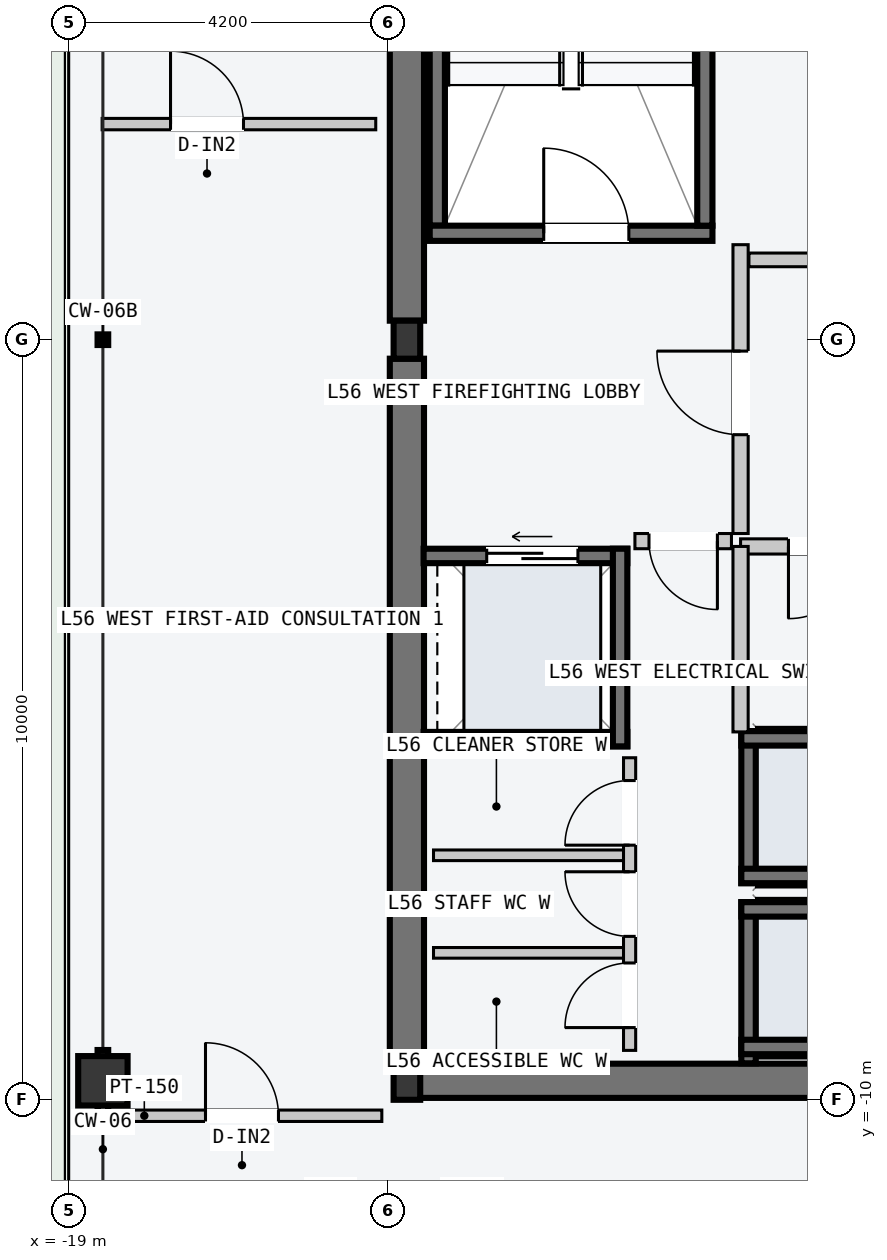
"""IFC4 building model, lengths in metres.
Left out: names, types, materials, properties, quantities, classifications, styles, units other than length and angle.
Written with IfcOpenShell. Run it as: python <this file> out.ifc"""

import sys

from ifc_helpers import new_model, si_unit, direction, frame, frame_2d, origin, origin_2d, place, context, subcontext, project, spatial, rectangle, hollow_rectangle, i_section, extrude, element, fill, save


model = new_model("IFC4")
c1 = context("Model", 3, precision=1e-05, world=origin(), true_north=direction((0.0, 1.0)))
c2 = subcontext(c1, "Body", "Model", "MODEL_VIEW")
j1 = project(units=[si_unit("LENGTHUNIT", "METRE"), si_unit("PLANEANGLEUNIT", "RADIAN")], contexts=[c1])
p1 = place(None, origin())
s1 = spatial("IfcSite", under=j1, at=p1, CompositionType="ELEMENT")
p2 = place(p1, origin())
s2 = spatial("IfcBuilding", under=s1, at=p2, CompositionType="ELEMENT")
p3 = place(p2, frame((0.0, 0.0, 213.9)))
s3 = spatial("IfcBuildingStorey", under=s2, at=p3, CompositionType="ELEMENT", Elevation=213.9)
p4 = place(p3, frame((-14.53, -9.75, -0.2), z_axis=(0.0, 0.0, 1.0), x_axis=(1.0, 0.0, 0.0)))
e1 = element("IfcWall", 1, at=p4, inside=s3, PredefinedType="SHEAR", context=c2, shape_type="SweptSolid", body=[
    extrude(rectangle(XDim=6.46, YDim=0.45, at=frame_2d((3.23, 0.0))), origin(), (0.0, 0.0, 1.0), 4.5),
])
for number, where, z_axis, x_axis in (
    (2, (-14.55, -9.5, -0.2), (0.0, 0.0, 1.0), (0.0, 1.0, 0.0)),
    (3, (-14.55, 0.25, -0.2), (0.0, 0.0, 1.0), (0.0, 1.0, 0.0)),
):
    element("IfcWall", number, at=place(p3, frame(where, z_axis=z_axis, x_axis=x_axis)), inside=s3, PredefinedType="SHEAR", context=c2, shape_type="SweptSolid", body=[
        extrude(rectangle(XDim=9.25, YDim=0.45, at=frame_2d((4.625, 0.0))), origin(), (0.0, 0.0, 1.0), 4.5),
    ])
p5 = place(p3, frame((-14.15, 1.5, -0.2), z_axis=(0.0, 0.0, 1.0), x_axis=(0.0, 1.0, 0.0)))
e4 = element("IfcWall", 4, at=p5, inside=s3, PredefinedType="SOLIDWALL", context=c2, shape_type="SweptSolid", body=[
    extrude(rectangle(XDim=7.8, YDim=0.2, at=frame_2d((3.9, 0.0))), origin(), (0.0, 0.0, 1.0), 4.5),
])
p6 = place(p3, frame((-14.25, 1.4, -0.2), z_axis=(0.0, 0.0, 1.0), x_axis=(1.0, 0.0, 0.0)))
e5 = element("IfcWall", 5, at=p6, inside=s3, PredefinedType="SOLIDWALL", context=c2, shape_type="SweptSolid", body=[
    extrude(rectangle(XDim=3.72, YDim=0.2, at=frame_2d((1.86, 0.0))), origin(), (0.0, 0.0, 1.0), 4.5),
])
p7 = place(p6, frame((1.5, 0.0, 0.2)))
e6 = element("IfcOpeningElement", 6, at=p7, cuts=e5, PredefinedType="OPENING", context=c2, shape_type="SweptSolid", body=[
    extrude(rectangle(XDim=1.12, YDim=2.18, at=frame_2d((0.56, 1.09))), frame((0.0, 0.11, 0.0), z_axis=(0.0, -1.0, 0.0), x_axis=(1.0, 0.0, 0.0)), (0.0, 0.0, 1.0), 0.22),
])
p8 = place(p3, frame((-10.63, 1.5, -0.2), z_axis=(0.0, 0.0, 1.0), x_axis=(0.0, 1.0, 0.0)))
e7 = element("IfcWall", 7, at=p8, inside=s3, PredefinedType="SOLIDWALL", context=c2, shape_type="SweptSolid", body=[
    extrude(rectangle(XDim=7.8, YDim=0.2, at=frame_2d((3.9, 0.0))), origin(), (0.0, 0.0, 1.0), 4.5),
])
for number, where, z_axis, x_axis in (
    (8, (-14.55, -9.75, 0.0), (0.0, 0.0, 1.0), (1.0, 0.0, 0.0)),
    (9, (-14.55, 0.0, 0.0), (0.0, 0.0, 1.0), (1.0, 0.0, 0.0)),
):
    element("IfcColumn", number, at=place(p3, frame(where, z_axis=z_axis, x_axis=x_axis)), inside=s3, PredefinedType="COLUMN", context=c2, shape_type="SweptSolid", body=[
        extrude(i_section(OverallWidth=0.35, OverallDepth=0.5, WebThickness=0.02, FlangeThickness=0.032, at=origin_2d()), origin(), (0.0, 0.0, 1.0), 4.5),
    ])
p9 = place(p3, frame((-18.55, -9.75, -0.2), z_axis=(0.0, 0.0, 1.0), x_axis=(0.0, 1.0, 0.0)))
e10 = element("IfcColumn", 10, at=p9, inside=s3, PredefinedType="COLUMN", context=c2, shape_type="SweptSolid", body=[
    extrude(hollow_rectangle(XDim=0.65, YDim=0.65, WallThickness=0.028, at=origin_2d()), origin(), (0.0, 0.0, 1.0), 4.7),
])
p10 = place(p3, frame((-10.055, -9.52, -0.2), z_axis=(0.0, 0.0, 1.0), x_axis=(0.0, 1.0, 0.0)))
e11 = element("IfcWall", 11, at=p10, inside=s3, PredefinedType="SOLIDWALL", context=c2, shape_type="SweptSolid", body=[
    extrude(rectangle(XDim=2.12, YDim=0.19, at=frame_2d((1.06, 0.0))), origin(), (0.0, 0.0, 1.0), 4.5),
])
for number, where, z_axis, x_axis in (
    (12, (-10.15, -7.495, -0.2), (0.0, 0.0, 1.0), (1.0, 0.0, 0.0)),
    (13, (-10.15, -9.305, -0.2), (0.0, 0.0, 1.0), (1.0, 0.0, 0.0)),
):
    element("IfcWall", number, at=place(p3, frame(where, z_axis=z_axis, x_axis=x_axis)), inside=s3, PredefinedType="SOLIDWALL", context=c2, shape_type="SweptSolid", body=[
        extrude(rectangle(XDim=2.2, YDim=0.19, at=frame_2d((1.1, 0.0))), origin(), (0.0, 0.0, 1.0), 4.5),
    ])
p11 = place(p3, frame((-10.055, -7.15, -0.2), z_axis=(0.0, 0.0, 1.0), x_axis=(0.0, 1.0, 0.0)))
e14 = element("IfcWall", 14, at=p11, inside=s3, PredefinedType="SOLIDWALL", context=c2, shape_type="SweptSolid", body=[
    extrude(rectangle(XDim=2.0, YDim=0.19, at=frame_2d((1.0, 0.0))), origin(), (0.0, 0.0, 1.0), 4.5),
])
for number, where, z_axis, x_axis in (
    (15, (-10.15, -5.245, -0.2), (0.0, 0.0, 1.0), (1.0, 0.0, 0.0)),
    (16, (-10.15, -7.055, -0.2), (0.0, 0.0, 1.0), (1.0, 0.0, 0.0)),
):
    element("IfcWall", number, at=place(p3, frame(where, z_axis=z_axis, x_axis=x_axis)), inside=s3, PredefinedType="SOLIDWALL", context=c2, shape_type="SweptSolid", body=[
        extrude(rectangle(XDim=2.2, YDim=0.19, at=frame_2d((1.1, 0.0))), origin(), (0.0, 0.0, 1.0), 4.5),
    ])
p12 = place(p3, frame((-14.33, -2.845, -0.2), z_axis=(0.0, 0.0, 1.0), x_axis=(1.0, 0.0, 0.0)))
e17 = element("IfcWall", 17, at=p12, inside=s3, PredefinedType="SOLIDWALL", context=c2, shape_type="SweptSolid", body=[
    extrude(rectangle(XDim=2.68, YDim=0.19, at=frame_2d((1.34, 0.0))), origin(), (0.0, 0.0, 1.0), 4.5),
])
p13 = place(p12, frame((0.83, 0.0, 0.2)))
e18 = element("IfcOpeningElement", 18, at=p13, cuts=e17, PredefinedType="OPENING", context=c2, shape_type="SweptSolid", body=[
    extrude(rectangle(XDim=1.2, YDim=2.2, at=frame_2d((0.6, 1.1))), frame((0.0, 0.105, 0.0), z_axis=(0.0, -1.0, 0.0), x_axis=(1.0, 0.0, 0.0)), (0.0, 0.0, 1.0), 0.21),
])
p14 = place(p3, frame((-14.33, -5.255, -0.2), z_axis=(0.0, 0.0, 1.0), x_axis=(1.0, 0.0, 0.0)))
e19 = element("IfcWall", 19, at=p14, inside=s3, PredefinedType="SOLIDWALL", context=c2, shape_type="SweptSolid", body=[
    extrude(rectangle(XDim=2.68, YDim=0.19, at=frame_2d((1.34, 0.0))), origin(), (0.0, 0.0, 1.0), 4.5),
])
p15 = place(p3, frame((-11.745, -5.35, -0.2), z_axis=(0.0, 0.0, 1.0), x_axis=(0.0, 1.0, 0.0)))
e20 = element("IfcWall", 20, at=p15, inside=s3, PredefinedType="SOLIDWALL", context=c2, shape_type="SweptSolid", body=[
    extrude(rectangle(XDim=2.6, YDim=0.19, at=frame_2d((1.3, 0.0))), origin(), (0.0, 0.0, 1.0), 4.5),
])
p16 = place(p3, frame((-10.16, -2.55, 0.0), z_axis=(0.0, 0.0, 1.0), x_axis=(0.0, 1.0, 0.0)))
e21 = element("IfcWall", 21, at=p16, inside=s3, PredefinedType="PARTITIONING", context=c2, shape_type="SweptSolid", body=[
    extrude(rectangle(XDim=3.8, YDim=0.2, at=frame_2d((1.9, 0.0))), origin(), (0.0, 0.0, 1.0), 4.3),
])
p17 = place(p16, frame((1.3, 0.0, 0.0)))
e22 = element("IfcOpeningElement", 22, at=p17, cuts=e21, PredefinedType="OPENING", context=c2, shape_type="SweptSolid", body=[
    extrude(rectangle(XDim=1.1, YDim=2.15, at=frame_2d((0.55, 1.075))), frame((0.0, 0.11, 0.0), z_axis=(0.0, -1.0, 0.0), x_axis=(1.0, 0.0, 0.0)), (0.0, 0.0, 1.0), 0.22),
])
p18 = place(p3, frame((-10.28, -2.65, 0.0), z_axis=(0.0, 0.0, 1.0), x_axis=(-1.0, 0.0, 0.0)))
e23 = element("IfcWall", 23, at=p18, inside=s3, PredefinedType="PARTITIONING", context=c2, shape_type="SweptSolid", body=[
    extrude(rectangle(XDim=1.27, YDim=0.2, at=frame_2d((0.635, 0.0))), origin(), (0.0, 0.0, 1.0), 4.3),
])
p19 = place(p18, frame((0.185, 0.0, 0.0)))
e24 = element("IfcOpeningElement", 24, at=p19, cuts=e23, PredefinedType="OPENING", context=c2, shape_type="SweptSolid", body=[
    extrude(rectangle(XDim=0.9, YDim=2.15, at=frame_2d((0.45, 1.075))), frame((0.0, 0.11, 0.0), z_axis=(0.0, -1.0, 0.0), x_axis=(1.0, 0.0, 0.0)), (0.0, 0.0, 1.0), 0.22),
])
p20 = place(p3, frame((-7.96, -2.72, 0.0), z_axis=(0.0, 0.0, 1.0), x_axis=(-1.0, 0.0, 0.0)))
e25 = element("IfcWall", 25, at=p20, inside=s3, PredefinedType="PARTITIONING", context=c2, shape_type="SweptSolid", body=[
    extrude(rectangle(XDim=2.2, YDim=0.2, at=frame_2d((1.1, 0.0))), origin(), (0.0, 0.0, 1.0), 4.3),
])
p21 = place(p20, frame((0.62, 0.0, 0.0)))
e26 = element("IfcOpeningElement", 26, at=p21, cuts=e25, PredefinedType="OPENING", context=c2, shape_type="SweptSolid", body=[
    extrude(rectangle(XDim=0.95, YDim=2.1, at=frame_2d((0.475, 1.05))), frame((0.0, 0.11, 0.0), z_axis=(0.0, -1.0, 0.0), x_axis=(1.0, 0.0, 0.0)), (0.0, 0.0, 1.0), 0.22),
])
p22 = place(p3, frame((-10.16, -5.16, 0.0), z_axis=(0.0, 0.0, 1.0), x_axis=(0.0, 1.0, 0.0)))
e27 = element("IfcWall", 27, at=p22, inside=s3, PredefinedType="PARTITIONING", context=c2, shape_type="SweptSolid", body=[
    extrude(rectangle(XDim=2.44, YDim=0.2, at=frame_2d((1.22, 0.0))), origin(), (0.0, 0.0, 1.0), 4.3),
])
for number, where, z_axis, x_axis in (
    (28, (-11.7, -8.067, 0.0), (0.0, 0.0, 1.0), (-1.0, 0.0, 0.0)),
    (29, (-11.7, -6.783, 0.0), (0.0, 0.0, 1.0), (-1.0, 0.0, 0.0)),
):
    element("IfcWall", number, at=place(p3, frame(where, z_axis=z_axis, x_axis=x_axis)), inside=s3, PredefinedType="PARTITIONING", context=c2, shape_type="SweptSolid", body=[
        extrude(rectangle(XDim=2.5, YDim=0.14, at=frame_2d((1.25, 0.0))), origin(), (0.0, 0.0, 1.0), 4.3),
    ])
p23 = place(p3, frame((-11.62, -9.35, 0.0), z_axis=(0.0, 0.0, 1.0), x_axis=(0.0, 1.0, 0.0)))
e30 = element("IfcWall", 30, at=p23, inside=s3, PredefinedType="PARTITIONING", context=c2, shape_type="SweptSolid", body=[
    extrude(rectangle(XDim=3.85, YDim=0.16, at=frame_2d((1.925, 0.0))), origin(), (0.0, 0.0, 1.0), 4.3),
])
p24 = place(p23, frame((0.3, 0.0, 0.0)))
e31 = element("IfcOpeningElement", 31, at=p24, cuts=e30, PredefinedType="OPENING", context=c2, shape_type="SweptSolid", body=[
    extrude(rectangle(XDim=0.85, YDim=2.12, at=frame_2d((0.425, 1.06))), frame((0.0, 0.09, 0.0), z_axis=(0.0, -1.0, 0.0), x_axis=(1.0, 0.0, 0.0)), (0.0, 0.0, 1.0), 0.18),
])
p25 = place(p23, frame((1.5, 0.0, 0.0)))
e32 = element("IfcOpeningElement", 32, at=p25, cuts=e30, PredefinedType="OPENING", context=c2, shape_type="SweptSolid", body=[
    extrude(rectangle(XDim=0.85, YDim=2.12, at=frame_2d((0.425, 1.06))), frame((0.0, 0.09, 0.0), z_axis=(0.0, -1.0, 0.0), x_axis=(1.0, 0.0, 0.0)), (0.0, 0.0, 1.0), 0.18),
])
p26 = place(p23, frame((2.7, 0.0, 0.0)))
e33 = element("IfcOpeningElement", 33, at=p26, cuts=e30, PredefinedType="OPENING", context=c2, shape_type="SweptSolid", body=[
    extrude(rectangle(XDim=0.85, YDim=2.12, at=frame_2d((0.425, 1.06))), frame((0.0, 0.09, 0.0), z_axis=(0.0, -1.0, 0.0), x_axis=(1.0, 0.0, 0.0)), (0.0, 0.0, 1.0), 0.18),
])
p27 = place(p3, frame((-10.05, 1.05, 0.0), z_axis=(0.0, 0.0, 1.0), x_axis=(1.0, 0.0, 0.0)))
e34 = element("IfcWall", 34, at=p27, inside=s3, PredefinedType="PARTITIONING", context=c2, shape_type="SweptSolid", body=[
    extrude(rectangle(XDim=10.54, YDim=0.18, at=frame_2d((5.27, 0.0))), origin(), (0.0, 0.0, 1.0), 4.3),
])
p28 = place(p3, frame((-18.56, -10.21, 0.0), z_axis=(0.0, 0.0, 1.0), x_axis=(1.0, 0.0, 0.0)))
e35 = element("IfcWall", 35, at=p28, inside=s3, PredefinedType="PARTITIONING", context=c2, shape_type="SweptSolid", body=[
    extrude(rectangle(XDim=3.68, YDim=0.15, at=frame_2d((1.84, 0.0))), origin(), (0.0, 0.0, 1.0), 4.3),
])
p29 = place(p28, frame((1.36, 0.0, 0.0)))
e36 = element("IfcOpeningElement", 36, at=p29, cuts=e35, PredefinedType="OPENING", context=c2, shape_type="SweptSolid", body=[
    extrude(rectangle(XDim=0.96, YDim=2.18, at=frame_2d((0.48, 1.09))), frame((0.0, 0.085, 0.0), z_axis=(0.0, -1.0, 0.0), x_axis=(1.0, 0.0, 0.0)), (0.0, 0.0, 1.0), 0.17),
])
p30 = place(p3, frame((-18.56, 2.836, 0.0), z_axis=(0.0, 0.0, 1.0), x_axis=(1.0, 0.0, 0.0)))
e37 = element("IfcWall", 37, at=p30, inside=s3, PredefinedType="PARTITIONING", context=c2, shape_type="SweptSolid", body=[
    extrude(rectangle(XDim=3.6, YDim=0.15, at=frame_2d((1.8, 0.0))), origin(), (0.0, 0.0, 1.0), 4.3),
])
p31 = place(p30, frame((0.9, 0.0, 0.0)))
e38 = element("IfcOpeningElement", 38, at=p31, cuts=e37, PredefinedType="OPENING", context=c2, shape_type="SweptSolid", body=[
    extrude(rectangle(XDim=0.96, YDim=2.18, at=frame_2d((0.48, 1.09))), frame((0.0, 0.085, 0.0), z_axis=(0.0, -1.0, 0.0), x_axis=(1.0, 0.0, 0.0)), (0.0, 0.0, 1.0), 0.17),
])
p32 = place(p7, origin())
e39 = element("IfcDoor", 39, at=p32, inside=s3, OperationType="SINGLE_SWING_LEFT", PredefinedType="DOOR", context=c2, shape_type="SweptSolid", body=[
    extrude(rectangle(XDim=1.12, YDim=2.18, at=frame_2d((0.56, 1.09))), frame((0.0, 0.025, 0.0), z_axis=(0.0, -1.0, 0.0), x_axis=(1.0, 0.0, 0.0)), (0.0, 0.0, 1.0), 0.05),
])
fill(e6, e39)
p33 = place(p13, origin())
e40 = element("IfcDoor", 40, at=p33, inside=s3, OperationType="SLIDING_TO_LEFT", PredefinedType="DOOR", context=c2, shape_type="SweptSolid", body=[
    extrude(rectangle(XDim=1.2, YDim=2.2, at=frame_2d((0.6, 1.1))), frame((0.0, 0.025, 0.0), z_axis=(0.0, -1.0, 0.0), x_axis=(1.0, 0.0, 0.0)), (0.0, 0.0, 1.0), 0.05),
])
fill(e18, e40)
p34 = place(p17, origin())
e41 = element("IfcDoor", 41, at=p34, inside=s3, OperationType="SINGLE_SWING_RIGHT", PredefinedType="DOOR", context=c2, shape_type="SweptSolid", body=[
    extrude(rectangle(XDim=1.1, YDim=2.15, at=frame_2d((0.55, 1.075))), frame((0.0, 0.025, 0.0), z_axis=(0.0, -1.0, 0.0), x_axis=(1.0, 0.0, 0.0)), (0.0, 0.0, 1.0), 0.05),
])
fill(e22, e41)
p35 = place(p19, origin())
e42 = element("IfcDoor", 42, at=p35, inside=s3, OperationType="SINGLE_SWING_LEFT", PredefinedType="DOOR", context=c2, shape_type="SweptSolid", body=[
    extrude(rectangle(XDim=0.9, YDim=2.15, at=frame_2d((0.45, 1.075))), frame((0.0, 0.025, 0.0), z_axis=(0.0, -1.0, 0.0), x_axis=(1.0, 0.0, 0.0)), (0.0, 0.0, 1.0), 0.05),
])
fill(e24, e42)
p36 = place(p21, origin())
e43 = element("IfcDoor", 43, at=p36, inside=s3, OperationType="SINGLE_SWING_RIGHT", PredefinedType="DOOR", context=c2, shape_type="SweptSolid", body=[
    extrude(rectangle(XDim=0.95, YDim=2.1, at=frame_2d((0.475, 1.05))), frame((0.0, 0.025, 0.0), z_axis=(0.0, -1.0, 0.0), x_axis=(1.0, 0.0, 0.0)), (0.0, 0.0, 1.0), 0.05),
])
fill(e26, e43)
p37 = place(p24, origin())
e44 = element("IfcDoor", 44, at=p37, inside=s3, OperationType="SINGLE_SWING_LEFT", PredefinedType="DOOR", context=c2, shape_type="SweptSolid", body=[
    extrude(rectangle(XDim=0.85, YDim=2.12, at=frame_2d((0.425, 1.06))), frame((0.0, 0.025, 0.0), z_axis=(0.0, -1.0, 0.0), x_axis=(1.0, 0.0, 0.0)), (0.0, 0.0, 1.0), 0.05),
])
fill(e31, e44)
p38 = place(p25, origin())
e45 = element("IfcDoor", 45, at=p38, inside=s3, OperationType="SINGLE_SWING_RIGHT", PredefinedType="DOOR", context=c2, shape_type="SweptSolid", body=[
    extrude(rectangle(XDim=0.85, YDim=2.12, at=frame_2d((0.425, 1.06))), frame((0.0, 0.025, 0.0), z_axis=(0.0, -1.0, 0.0), x_axis=(1.0, 0.0, 0.0)), (0.0, 0.0, 1.0), 0.05),
])
fill(e32, e45)
p39 = place(p26, origin())
e46 = element("IfcDoor", 46, at=p39, inside=s3, OperationType="SINGLE_SWING_LEFT", PredefinedType="DOOR", context=c2, shape_type="SweptSolid", body=[
    extrude(rectangle(XDim=0.85, YDim=2.12, at=frame_2d((0.425, 1.06))), frame((0.0, 0.025, 0.0), z_axis=(0.0, -1.0, 0.0), x_axis=(1.0, 0.0, 0.0)), (0.0, 0.0, 1.0), 0.05),
])
fill(e33, e46)
p40 = place(p29, origin())
e47 = element("IfcDoor", 47, at=p40, inside=s3, OperationType="SINGLE_SWING_LEFT", PredefinedType="DOOR", context=c2, shape_type="SweptSolid", body=[
    extrude(rectangle(XDim=0.96, YDim=2.18, at=frame_2d((0.48, 1.09))), frame((0.0, 0.025, 0.0), z_axis=(0.0, -1.0, 0.0), x_axis=(1.0, 0.0, 0.0)), (0.0, 0.0, 1.0), 0.05),
])
fill(e36, e47)
p41 = place(p31, origin())
e48 = element("IfcDoor", 48, at=p41, inside=s3, OperationType="SINGLE_SWING_LEFT", PredefinedType="DOOR", context=c2, shape_type="SweptSolid", body=[
    extrude(rectangle(XDim=0.96, YDim=2.18, at=frame_2d((0.48, 1.09))), frame((0.0, 0.025, 0.0), z_axis=(0.0, -1.0, 0.0), x_axis=(1.0, 0.0, 0.0)), (0.0, 0.0, 1.0), 0.05),
])
fill(e38, e48)
save(model, sys.argv[1])
